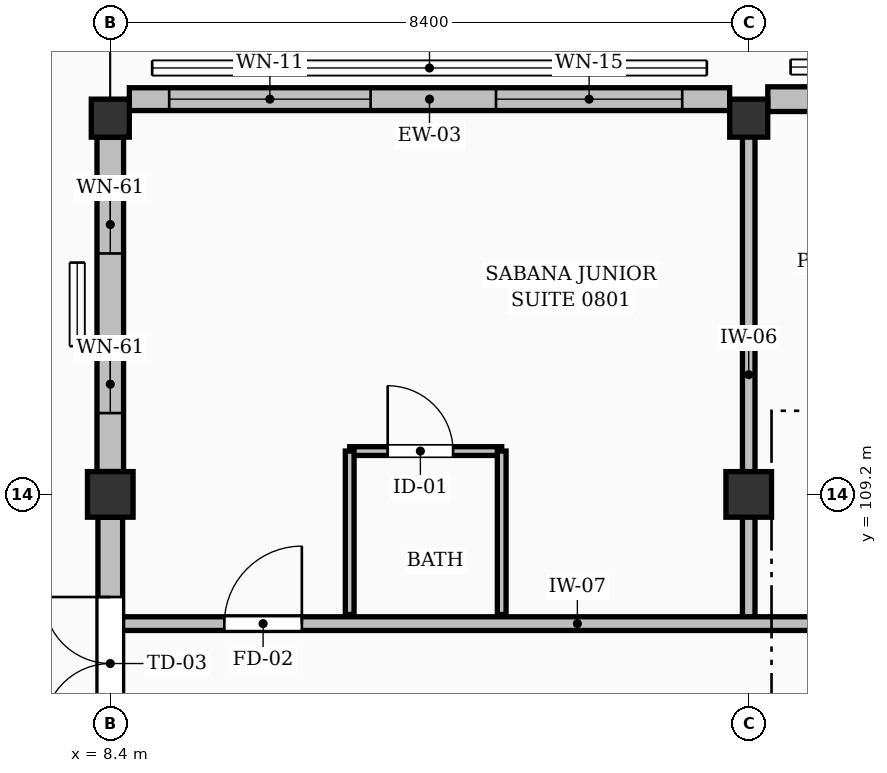
"""IFC4 building model, lengths in metres.
Left out: names, types, materials, properties, quantities, classifications, styles, units other than length and angle.
Written with IfcOpenShell. Run it as: python <this file> out.ifc"""

import sys

from ifc_helpers import new_model, si_unit, direction, frame, frame_2d, origin, origin_2d, place, context, subcontext, project, spatial, rectangle, extrude, element, fill, save


model = new_model("IFC4")
c1 = context("Model", 3, precision=1e-05, world=origin(), true_north=direction((0.0, 1.0)))
c2 = subcontext(c1, "Body", "Model", "MODEL_VIEW")
j1 = project(units=[si_unit("LENGTHUNIT", "METRE"), si_unit("PLANEANGLEUNIT", "RADIAN")], contexts=[c1])
p1 = place(None, origin())
s1 = spatial("IfcSite", under=j1, at=p1, CompositionType="ELEMENT")
p2 = place(p1, origin())
s2 = spatial("IfcBuilding", under=s1, at=p2, CompositionType="ELEMENT")
p3 = place(p2, frame((0.0, 0.0, 28.56)))
s3 = spatial("IfcBuildingStorey", under=s2, at=p3, CompositionType="ELEMENT", Elevation=28.56)
p4 = place(p3, frame((8.4, 109.2, 0.0), z_axis=(0.0, 0.0, 1.0), x_axis=(1.0, 0.0, 0.0)))
e1 = element("IfcColumn", 1, at=p4, inside=s3, PredefinedType="COLUMN", context=c2, shape_type="SweptSolid", body=[
    extrude(rectangle(XDim=0.6, YDim=0.6, at=origin_2d()), origin(), (0.0, 0.0, 1.0), 3.36),
])
p5 = place(p3, frame((8.4, 114.15, -0.315), z_axis=(0.0, 0.0, 1.0), x_axis=(1.0, 0.0, 0.0)))
e2 = element("IfcColumn", 2, at=p5, inside=s3, PredefinedType="COLUMN", context=c2, shape_type="SweptSolid", body=[
    extrude(rectangle(XDim=0.5, YDim=0.5, at=origin_2d()), origin(), (0.0, 0.0, 1.0), 3.675),
])
p6 = place(p3, frame((16.8, 109.2, 0.0), z_axis=(0.0, 0.0, 1.0), x_axis=(1.0, 0.0, 0.0)))
e3 = element("IfcColumn", 3, at=p6, inside=s3, PredefinedType="COLUMN", context=c2, shape_type="SweptSolid", body=[
    extrude(rectangle(XDim=0.6, YDim=0.6, at=origin_2d()), origin(), (0.0, 0.0, 1.0), 3.36),
])
p7 = place(p3, frame((16.8, 114.15, -0.315), z_axis=(0.0, 0.0, 1.0), x_axis=(1.0, 0.0, 0.0)))
e4 = element("IfcColumn", 4, at=p7, inside=s3, PredefinedType="COLUMN", context=c2, shape_type="SweptSolid", body=[
    extrude(rectangle(XDim=0.5, YDim=0.5, at=origin_2d()), origin(), (0.0, 0.0, 1.0), 3.675),
])
p8 = place(p3, frame((8.651, 114.4, 0.0), z_axis=(0.0, 0.0, 1.0), x_axis=(1.0, 0.0, 0.0)))
e5 = element("IfcWall", 5, at=p8, inside=s3, PredefinedType="SOLIDWALL", context=c2, shape_type="SweptSolid", body=[
    extrude(rectangle(XDim=7.898, YDim=0.3, at=frame_2d((3.949, 0.0))), origin(), (0.0, 0.0, 1.0), 2.494),
])
p9 = place(p8, frame((0.524, 0.0, 0.25)))
e6 = element("IfcOpeningElement", 6, at=p9, cuts=e5, PredefinedType="OPENING", context=c2, shape_type="SweptSolid", body=[
    extrude(rectangle(XDim=2.65, YDim=1.95, at=frame_2d((1.325, 0.975))), frame((0.0, 0.16, 0.0), z_axis=(0.0, -1.0, 0.0), x_axis=(1.0, 0.0, 0.0)), (0.0, 0.0, 1.0), 0.32),
])
p10 = place(p8, frame((4.824, 0.0, 0.25)))
e7 = element("IfcOpeningElement", 7, at=p10, cuts=e5, PredefinedType="OPENING", context=c2, shape_type="SweptSolid", body=[
    extrude(rectangle(XDim=2.45, YDim=2.05, at=frame_2d((1.225, 1.025))), frame((0.0, 0.16, 0.0), z_axis=(0.0, -1.0, 0.0), x_axis=(1.0, 0.0, 0.0)), (0.0, 0.0, 1.0), 0.32),
])
p11 = place(p3, frame((17.051, 114.4, 0.0), z_axis=(0.0, 0.0, 1.0), x_axis=(1.0, 0.0, 0.0)))
e8 = element("IfcWall", 8, at=p11, inside=s3, PredefinedType="SOLIDWALL", context=c2, shape_type="SweptSolid", body=[
    extrude(rectangle(XDim=7.898, YDim=0.325, at=frame_2d((3.949, 0.0))), origin(), (0.0, 0.0, 1.0), 2.494),
])
p12 = place(p11, frame((0.674, 0.0, 0.25)))
e9 = element("IfcOpeningElement", 9, at=p12, cuts=e8, PredefinedType="OPENING", context=c2, shape_type="SweptSolid", body=[
    extrude(rectangle(XDim=2.35, YDim=2.05, at=frame_2d((1.175, 1.025))), frame((0.0, 0.172, 0.0), z_axis=(0.0, -1.0, 0.0), x_axis=(1.0, 0.0, 0.0)), (0.0, 0.0, 1.0), 0.345),
])
p13 = place(p11, frame((4.849, 0.0, 0.25)))
e10 = element("IfcOpeningElement", 10, at=p13, cuts=e8, PredefinedType="OPENING", context=c2, shape_type="SweptSolid", body=[
    extrude(rectangle(XDim=2.4, YDim=1.75, at=frame_2d((1.2, 0.875))), frame((0.0, 0.172, 0.0), z_axis=(0.0, -1.0, 0.0), x_axis=(1.0, 0.0, 0.0)), (0.0, 0.0, 1.0), 0.345),
])
p14 = place(p3, frame((8.4, 101.101, 0.0), z_axis=(0.0, 0.0, 1.0), x_axis=(0.0, 1.0, 0.0)))
e11 = element("IfcWall", 11, at=p14, inside=s3, PredefinedType="SOLIDWALL", context=c2, shape_type="SweptSolid", body=[
    extrude(rectangle(XDim=7.798, YDim=0.325, at=frame_2d((3.899, 0.0))), origin(), (0.0, 0.0, 1.0), 2.494),
])
p15 = place(p14, frame((4.999, 0.0, 0.0)))
e12 = element("IfcOpeningElement", 12, at=p15, cuts=e11, PredefinedType="OPENING", context=c2, shape_type="SweptSolid", body=[
    extrude(rectangle(XDim=1.75, YDim=2.08, at=frame_2d((0.875, 1.04))), frame((0.0, 0.172, 0.0), z_axis=(0.0, -1.0, 0.0), x_axis=(1.0, 0.0, 0.0)), (0.0, 0.0, 1.0), 0.345),
])
p16 = place(p3, frame((8.4, 109.501, 0.0), z_axis=(0.0, 0.0, 1.0), x_axis=(0.0, 1.0, 0.0)))
e13 = element("IfcWall", 13, at=p16, inside=s3, PredefinedType="SOLIDWALL", context=c2, shape_type="SweptSolid", body=[
    extrude(rectangle(XDim=4.398, YDim=0.35, at=frame_2d((2.199, 0.0))), origin(), (0.0, 0.0, 1.0), 2.41),
])
p17 = place(p16, frame((0.769, 0.0, 0.3)))
e14 = element("IfcOpeningElement", 14, at=p17, cuts=e13, PredefinedType="OPENING", context=c2, shape_type="SweptSolid", body=[
    extrude(rectangle(XDim=0.76, YDim=1.75, at=frame_2d((0.38, 0.875))), frame((0.0, 0.185, 0.0), z_axis=(0.0, -1.0, 0.0), x_axis=(1.0, 0.0, 0.0)), (0.0, 0.0, 1.0), 0.37),
])
p18 = place(p16, frame((2.869, 0.0, 0.3)))
e15 = element("IfcOpeningElement", 15, at=p18, cuts=e13, PredefinedType="OPENING", context=c2, shape_type="SweptSolid", body=[
    extrude(rectangle(XDim=0.76, YDim=1.75, at=frame_2d((0.38, 0.875))), frame((0.0, 0.185, 0.0), z_axis=(0.0, -1.0, 0.0), x_axis=(1.0, 0.0, 0.0)), (0.0, 0.0, 1.0), 0.37),
])
p19 = place(p3, frame((11.55, 109.77, 0.0), z_axis=(0.0, 0.0, 1.0), x_axis=(1.0, 0.0, 0.0)))
e16 = element("IfcWall", 16, at=p19, inside=s3, PredefinedType="PARTITIONING", context=c2, shape_type="SweptSolid", body=[
    extrude(rectangle(XDim=2.0, YDim=0.115, at=frame_2d((1.0, 0.0))), origin(), (0.0, 0.0, 1.0), 3.12),
])
p20 = place(p19, frame((0.5, 0.0, 0.0)))
e17 = element("IfcOpeningElement", 17, at=p20, cuts=e16, PredefinedType="OPENING", context=c2, shape_type="SweptSolid", body=[
    extrude(rectangle(XDim=0.86, YDim=2.05, at=frame_2d((0.43, 1.025))), frame((0.0, 0.067, 0.0), z_axis=(0.0, -1.0, 0.0), x_axis=(1.0, 0.0, 0.0)), (0.0, 0.0, 1.0), 0.135),
])
for number, where, z_axis, x_axis in (
    (18, (11.55, 107.62, 0.0), (0.0, 0.0, 1.0), (0.0, 1.0, 0.0)),
    (19, (13.55, 107.62, 0.0), (0.0, 0.0, 1.0), (0.0, 1.0, 0.0)),
):
    element("IfcWall", number, at=place(p3, frame(where, z_axis=z_axis, x_axis=x_axis)), inside=s3, PredefinedType="PARTITIONING", context=c2, shape_type="SweptSolid", body=[
        extrude(rectangle(XDim=2.15, YDim=0.115, at=frame_2d((1.075, 0.0))), origin(), (0.0, 0.0, 1.0), 3.12),
    ])
p21 = place(p3, frame((16.8, 107.5, 0.0), z_axis=(0.0, 0.0, 1.0), x_axis=(0.0, 1.0, 0.0)))
e20 = element("IfcWall", 20, at=p21, inside=s3, PredefinedType="PARTITIONING", context=c2, shape_type="SweptSolid", body=[
    extrude(rectangle(XDim=6.55, YDim=0.165, at=frame_2d((3.275, 0.0))), origin(), (0.0, 0.0, 1.0), 2.41),
])
p22 = place(p3, frame((8.562, 107.5, 0.0), z_axis=(0.0, 0.0, 1.0), x_axis=(1.0, 0.0, 0.0)))
e21 = element("IfcWall", 21, at=p22, inside=s3, PredefinedType="PARTITIONING", context=c2, shape_type="SweptSolid", body=[
    extrude(rectangle(XDim=25.808, YDim=0.18, at=frame_2d((12.904, 0.0))), origin(), (0.0, 0.0, 1.0), 3.12),
])
p23 = place(p22, frame((1.338, 0.0, 0.0)))
e22 = element("IfcOpeningElement", 22, at=p23, cuts=e21, PredefinedType="OPENING", context=c2, shape_type="SweptSolid", body=[
    extrude(rectangle(XDim=1.02, YDim=2.15, at=frame_2d((0.51, 1.075))), frame((0.0, 0.1, 0.0), z_axis=(0.0, -1.0, 0.0), x_axis=(1.0, 0.0, 0.0)), (0.0, 0.0, 1.0), 0.2),
])
p24 = place(p22, frame((9.608, 0.0, 0.0)))
e23 = element("IfcOpeningElement", 23, at=p24, cuts=e21, PredefinedType="OPENING", context=c2, shape_type="SweptSolid", body=[
    extrude(rectangle(XDim=0.96, YDim=2.15, at=frame_2d((0.48, 1.075))), frame((0.0, 0.1, 0.0), z_axis=(0.0, -1.0, 0.0), x_axis=(1.0, 0.0, 0.0)), (0.0, 0.0, 1.0), 0.2),
])
p25 = place(p22, frame((14.267, 0.0, 0.0)))
e24 = element("IfcOpeningElement", 24, at=p25, cuts=e21, PredefinedType="OPENING", context=c2, shape_type="SweptSolid", body=[
    extrude(rectangle(XDim=0.96, YDim=2.15, at=frame_2d((0.48, 1.075))), frame((0.0, 0.1, 0.0), z_axis=(0.0, -1.0, 0.0), x_axis=(1.0, 0.0, 0.0)), (0.0, 0.0, 1.0), 0.2),
])
p26 = place(p22, frame((18.008, 0.0, 0.0)))
e25 = element("IfcOpeningElement", 25, at=p26, cuts=e21, PredefinedType="OPENING", context=c2, shape_type="SweptSolid", body=[
    extrude(rectangle(XDim=0.96, YDim=2.15, at=frame_2d((0.48, 1.075))), frame((0.0, 0.1, 0.0), z_axis=(0.0, -1.0, 0.0), x_axis=(1.0, 0.0, 0.0)), (0.0, 0.0, 1.0), 0.2),
])
p27 = place(p22, frame((22.668, 0.0, 0.0)))
e26 = element("IfcOpeningElement", 26, at=p27, cuts=e21, PredefinedType="OPENING", context=c2, shape_type="SweptSolid", body=[
    extrude(rectangle(XDim=0.96, YDim=2.15, at=frame_2d((0.48, 1.075))), frame((0.0, 0.1, 0.0), z_axis=(0.0, -1.0, 0.0), x_axis=(1.0, 0.0, 0.0)), (0.0, 0.0, 1.0), 0.2),
])
p28 = place(p9, origin())
e27 = element("IfcWindow", 27, at=p28, inside=s3, PartitioningType="DOUBLE_PANEL_VERTICAL", PredefinedType="WINDOW", context=c2, shape_type="SweptSolid", body=[
    extrude(rectangle(XDim=2.65, YDim=1.95, at=frame_2d((1.325, 0.975))), frame((0.0, 0.03, 0.0), z_axis=(0.0, -1.0, 0.0), x_axis=(1.0, 0.0, 0.0)), (0.0, 0.0, 1.0), 0.06),
])
fill(e6, e27)
p29 = place(p10, origin())
e28 = element("IfcWindow", 28, at=p29, inside=s3, PartitioningType="DOUBLE_PANEL_VERTICAL", PredefinedType="WINDOW", context=c2, shape_type="SweptSolid", body=[
    extrude(rectangle(XDim=2.45, YDim=2.05, at=frame_2d((1.225, 1.025))), frame((0.0, 0.03, 0.0), z_axis=(0.0, -1.0, 0.0), x_axis=(1.0, 0.0, 0.0)), (0.0, 0.0, 1.0), 0.06),
])
fill(e7, e28)
p30 = place(p15, origin())
e29 = element("IfcDoor", 29, at=p30, inside=s3, OperationType="DOUBLE_DOOR_SINGLE_SWING", PredefinedType="DOOR", context=c2, shape_type="SweptSolid", body=[
    extrude(rectangle(XDim=1.75, YDim=2.08, at=frame_2d((0.875, 1.04))), frame((0.0, 0.025, 0.0), z_axis=(0.0, -1.0, 0.0), x_axis=(1.0, 0.0, 0.0)), (0.0, 0.0, 1.0), 0.05),
])
fill(e12, e29)
p31 = place(p17, origin())
e30 = element("IfcWindow", 30, at=p31, inside=s3, PartitioningType="SINGLE_PANEL", PredefinedType="WINDOW", context=c2, shape_type="SweptSolid", body=[
    extrude(rectangle(XDim=0.76, YDim=1.75, at=frame_2d((0.38, 0.875))), frame((0.0, 0.03, 0.0), z_axis=(0.0, -1.0, 0.0), x_axis=(1.0, 0.0, 0.0)), (0.0, 0.0, 1.0), 0.06),
])
fill(e14, e30)
p32 = place(p18, origin())
e31 = element("IfcWindow", 31, at=p32, inside=s3, PartitioningType="SINGLE_PANEL", PredefinedType="WINDOW", context=c2, shape_type="SweptSolid", body=[
    extrude(rectangle(XDim=0.76, YDim=1.75, at=frame_2d((0.38, 0.875))), frame((0.0, 0.03, 0.0), z_axis=(0.0, -1.0, 0.0), x_axis=(1.0, 0.0, 0.0)), (0.0, 0.0, 1.0), 0.06),
])
fill(e15, e31)
p33 = place(p20, origin())
e32 = element("IfcDoor", 32, at=p33, inside=s3, OperationType="SINGLE_SWING_LEFT", PredefinedType="DOOR", context=c2, shape_type="SweptSolid", body=[
    extrude(rectangle(XDim=0.86, YDim=2.05, at=frame_2d((0.43, 1.025))), frame((0.0, 0.025, 0.0), z_axis=(0.0, -1.0, 0.0), x_axis=(1.0, 0.0, 0.0)), (0.0, 0.0, 1.0), 0.05),
])
fill(e17, e32)
p34 = place(p23, origin())
e33 = element("IfcDoor", 33, at=p34, inside=s3, OperationType="SINGLE_SWING_RIGHT", PredefinedType="DOOR", context=c2, shape_type="SweptSolid", body=[
    extrude(rectangle(XDim=1.02, YDim=2.15, at=frame_2d((0.51, 1.075))), frame((0.0, 0.025, 0.0), z_axis=(0.0, -1.0, 0.0), x_axis=(1.0, 0.0, 0.0)), (0.0, 0.0, 1.0), 0.05),
])
fill(e22, e33)
save(model, sys.argv[1])
